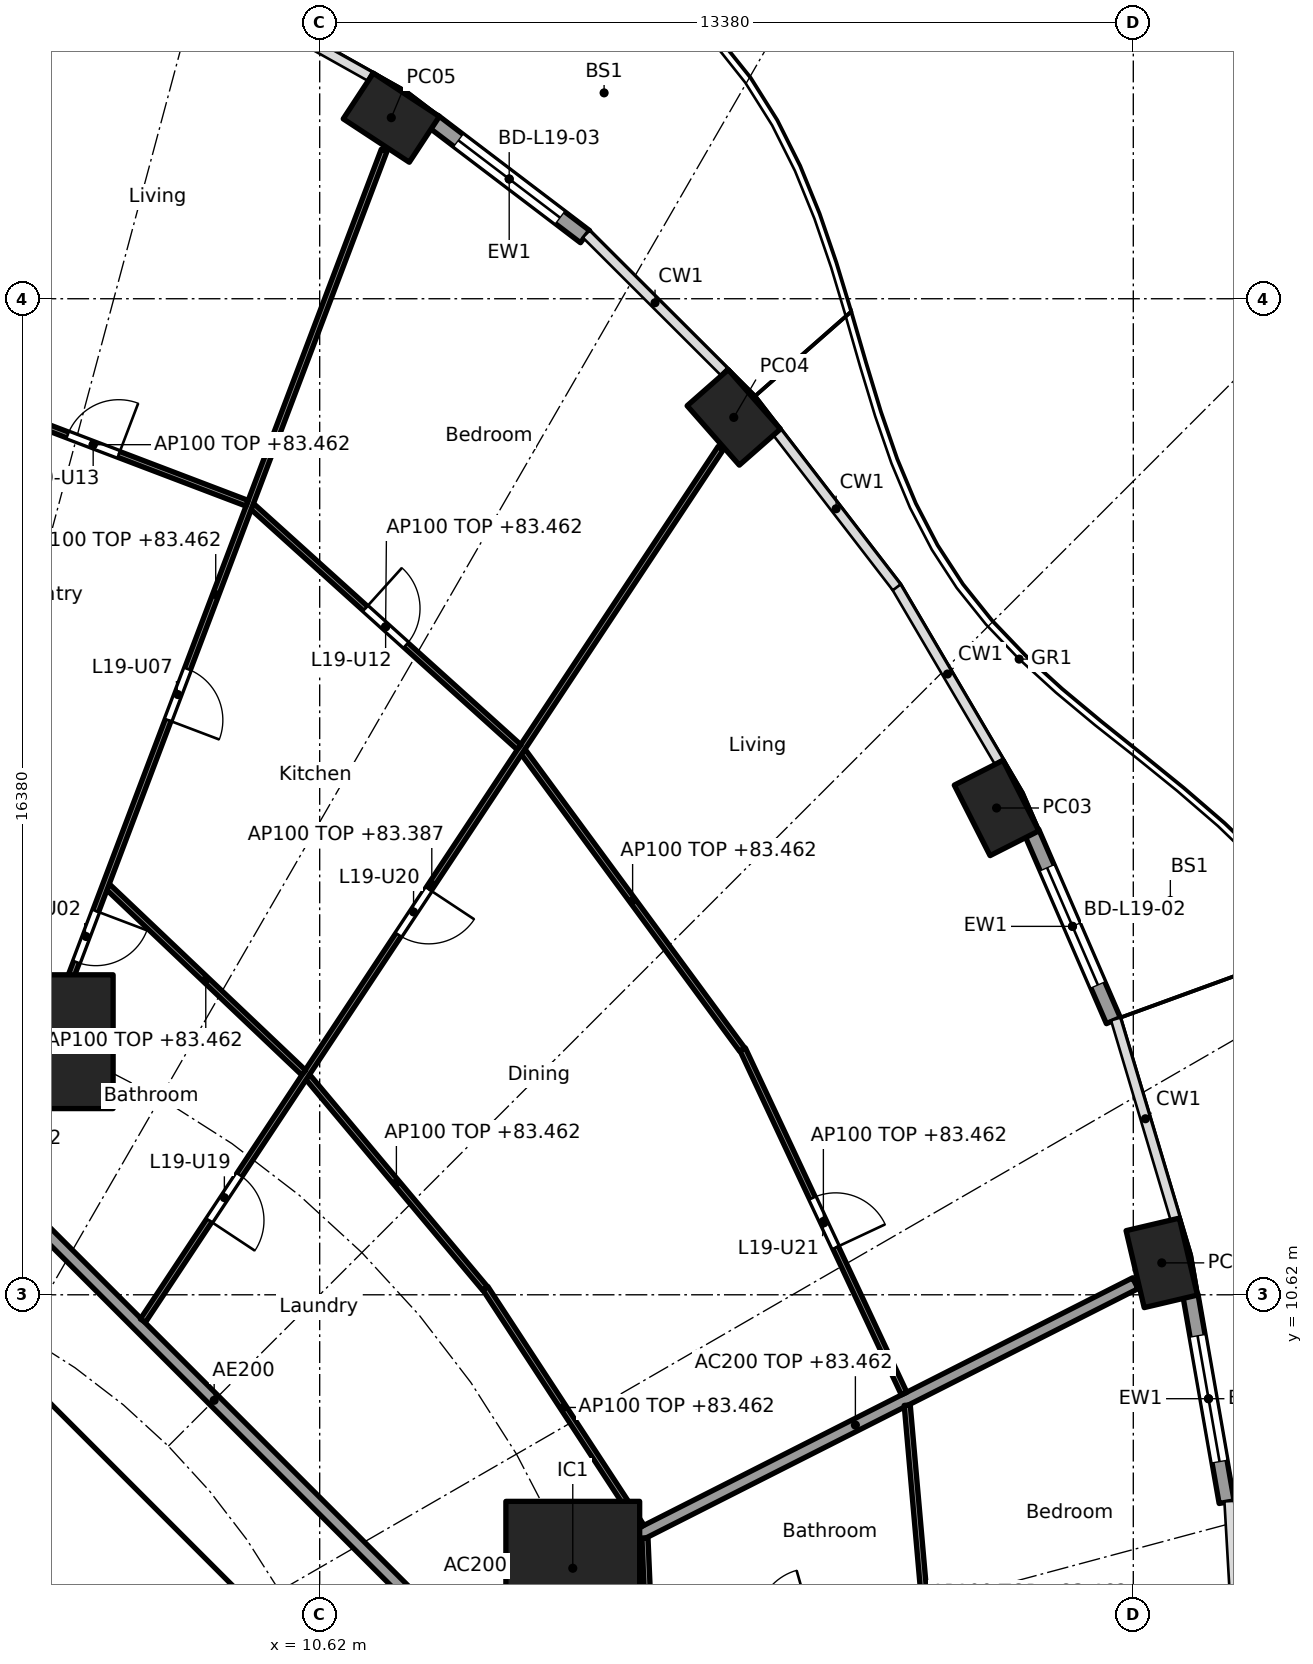
"""IFC4 building model, lengths in metres.
Left out: names, types, materials, properties, quantities, classifications, styles, units other than length and angle.
Written with IfcOpenShell. Run it as: python <this file> out.ifc"""

import sys

from ifc_helpers import new_model, si_unit, direction, frame, frame_2d, origin, origin_2d, place, context, subcontext, project, spatial, rectangle, hollow_rectangle, extrude, element, fill, save


model = new_model("IFC4")
c1 = context("Model", 3, precision=1e-05, world=origin(), true_north=direction((0.0, 1.0)))
c2 = subcontext(c1, "Body", "Model", "MODEL_VIEW")
j1 = project(units=[si_unit("LENGTHUNIT", "METRE"), si_unit("PLANEANGLEUNIT", "RADIAN")], contexts=[c1])
p1 = place(None, origin())
s1 = spatial("IfcSite", under=j1, at=p1, CompositionType="ELEMENT")
p2 = place(p1, origin())
s2 = spatial("IfcBuilding", under=s1, at=p2, CompositionType="ELEMENT")
p3 = place(p2, frame((0.0, 0.0, 80.7)))
s3 = spatial("IfcBuildingStorey", under=s2, at=p3, CompositionType="ELEMENT", Elevation=80.7)
for number, where, z_axis, x_axis in (
    (1, (24.468, 11.145, 0.0), (0.0, 0.0, 1.0), (-0.229, 0.973, 0.0)),
    (2, (21.751, 18.625, 0.0), (0.0, 0.0, 1.0), (-0.452, 0.892, 0.0)),
    (3, (17.43, 25.049, 0.0), (0.0, 0.0, 1.0), (-0.66, 0.751, 0.0)),
    (4, (11.798, 29.978, 0.0), (0.0, 0.0, 1.0), (-0.836, 0.549, 0.0)),
):
    element("IfcColumn", number, at=place(p3, frame(where, z_axis=z_axis, x_axis=x_axis)), inside=s3, PredefinedType="COLUMN", context=c2, shape_type="SweptSolid", body=[
        extrude(hollow_rectangle(XDim=1.3, YDim=0.9, WallThickness=0.045, at=origin_2d()), origin(), (0.0, 0.0, 1.0), 3.7),
    ])
for number, where, z_axis, x_axis in (
    (5, (14.782, 6.123, 0.0), (0.0, 0.0, 1.0), (1.0, 0.0, 0.0)),
    (6, (6.123, 14.782, 0.0), (0.0, 0.0, 1.0), (1.0, 0.0, 0.0)),
):
    element("IfcColumn", number, at=place(p3, frame(where, z_axis=z_axis, x_axis=x_axis)), inside=s3, PredefinedType="COLUMN", context=c2, shape_type="SweptSolid", body=[
        extrude(rectangle(XDim=2.2, YDim=2.2, at=origin_2d()), origin(), (0.0, 0.0, 1.0), 3.7),
    ])
p4 = place(p3, frame((24.94, 10.613, 0.0), z_axis=(0.0, 0.0, 1.0), x_axis=(0.172164316671, -0.985068245385, 0.0)))
e7 = element("IfcWall", 7, at=p4, inside=s3, PredefinedType="SOLIDWALL", context=c2, shape_type="SweptSolid", body=[
    extrude(rectangle(XDim=3.454, YDim=0.25, at=frame_2d((1.727, 0.0))), origin(), (0.0, 0.0, 1.0), 3.44),
])
p5 = place(p4, frame((0.677, 0.0, 0.0)))
e8 = element("IfcOpeningElement", 8, at=p5, cuts=e7, PredefinedType="OPENING", context=c2, shape_type="SweptSolid", body=[
    extrude(rectangle(XDim=2.1, YDim=2.4, at=frame_2d((1.05, 1.2))), frame((0.0, 0.135, 0.0), z_axis=(0.0, -1.0, 0.0), x_axis=(1.0, 0.0, 0.0)), (0.0, 0.0, 1.0), 0.27),
])
p6 = place(p3, frame((22.328, 18.229, 0.0), z_axis=(0.0, 0.0, 1.0), x_axis=(0.397621629246, -0.917549475481, 0.0)))
e9 = element("IfcWall", 9, at=p6, inside=s3, PredefinedType="SOLIDWALL", context=c2, shape_type="SweptSolid", body=[
    extrude(rectangle(XDim=3.379, YDim=0.25, at=frame_2d((1.69, 0.0))), origin(), (0.0, 0.0, 1.0), 3.44),
])
p7 = place(p6, frame((0.64, 0.0, 0.0)))
e10 = element("IfcOpeningElement", 10, at=p7, cuts=e9, PredefinedType="OPENING", context=c2, shape_type="SweptSolid", body=[
    extrude(rectangle(XDim=2.1, YDim=2.4, at=frame_2d((1.05, 1.2))), frame((0.0, 0.135, 0.0), z_axis=(0.0, -1.0, 0.0), x_axis=(1.0, 0.0, 0.0)), (0.0, 0.0, 1.0), 0.27),
])
p8 = place(p3, frame((12.489, 29.917, 0.0), z_axis=(0.0, 0.0, 1.0), x_axis=(0.796037575978, -0.605247203736, 0.0)))
e11 = element("IfcWall", 11, at=p8, inside=s3, PredefinedType="SOLIDWALL", context=c2, shape_type="SweptSolid", body=[
    extrude(rectangle(XDim=3.134, YDim=0.25, at=frame_2d((1.567, 0.0))), origin(), (0.0, 0.0, 1.0), 3.44),
])
p9 = place(p8, frame((0.517, 0.0, 0.0)))
e12 = element("IfcOpeningElement", 12, at=p9, cuts=e11, PredefinedType="OPENING", context=c2, shape_type="SweptSolid", body=[
    extrude(rectangle(XDim=2.1, YDim=2.4, at=frame_2d((1.05, 1.2))), frame((0.0, 0.135, 0.0), z_axis=(0.0, -1.0, 0.0), x_axis=(1.0, 0.0, 0.0)), (0.0, 0.0, 1.0), 0.27),
])
p10 = place(p3, frame((9.988, 4.613, 0.0), z_axis=(0.0, 0.0, 1.0), x_axis=(-0.707106781187, 0.707106781187, 0.0)))
e13 = element("IfcWall", 13, at=p10, inside=s3, PredefinedType="SHEAR", context=c2, shape_type="SweptSolid", body=[
    extrude(rectangle(XDim=7.602, YDim=0.6, at=frame_2d((3.801, 0.0))), origin(), (0.0, 0.0, 1.0), 3.44),
])
p11 = place(p10, frame((3.201, 0.0, 0.0)))
e14 = element("IfcOpeningElement", 14, at=p11, cuts=e13, PredefinedType="OPENING", context=c2, shape_type="SweptSolid", body=[
    extrude(rectangle(XDim=1.2, YDim=2.1, at=frame_2d((0.6, 1.05))), frame((0.0, 0.31, 0.0), z_axis=(0.0, -1.0, 0.0), x_axis=(1.0, 0.0, 0.0)), (0.0, 0.0, 1.0), 0.62),
])
p12 = place(p3, frame((12.657, 5.243, 0.0), z_axis=(0.0, 0.0, 1.0), x_axis=(0.923876145736, 0.382691608661, 0.0)))
e15 = element("IfcWall", 15, at=p12, inside=s3, PredefinedType="PARTITIONING", context=c2, shape_type="SweptSolid", body=[
    extrude(rectangle(XDim=2.2, YDim=0.2, at=frame_2d((1.1, 0.0))), origin(), (0.0, 0.0, 1.0), 3.44),
])
p13 = place(p3, frame((14.827, 6.146, 0.0), z_axis=(0.0, 0.0, 1.0), x_axis=(0.892068075337, 0.451901038906, 0.0)))
e16 = element("IfcWall", 16, at=p13, inside=s3, PredefinedType="PARTITIONING", context=c2, shape_type="SweptSolid", body=[
    extrude(rectangle(XDim=10.32, YDim=0.2, at=frame_2d((5.16, 0.0))), origin(), (0.0, 0.0, 1.0), 2.762),
])
p14 = place(p3, frame((12.635, 5.134, 0.0), z_axis=(0.0, 0.0, 1.0), x_axis=(-0.707106781187, 0.707106781187, 0.0)))
e17 = element("IfcWall", 17, at=p14, inside=s3, PredefinedType="PARTITIONING", context=c2, shape_type="SweptSolid", body=[
    extrude(rectangle(XDim=10.609, YDim=0.2, at=frame_2d((5.305, 0.0))), origin(), (0.0, 0.0, 1.0), 3.44),
])
p15 = place(p3, frame((20.825, 2.642, 0.0), z_axis=(0.0, 0.0, 1.0), x_axis=(-0.087760219522, 0.996141628419, 0.0)))
e18 = element("IfcWall", 18, at=p15, inside=s3, PredefinedType="PARTITIONING", context=c2, shape_type="SweptSolid", body=[
    extrude(rectangle(XDim=6.187, YDim=0.1, at=frame_2d((3.094, 0.0))), origin(), (0.0, 0.0, 1.0), 2.762),
])
p16 = place(p3, frame((16.064, 4.415, 0.0), z_axis=(0.0, 0.0, 1.0), x_axis=(-0.043101501373, 0.999070698489, 0.0)))
e19 = element("IfcWall", 19, at=p16, inside=s3, PredefinedType="PARTITIONING", context=c2, shape_type="SweptSolid", body=[
    extrude(rectangle(XDim=2.209, YDim=0.1, at=frame_2d((1.104, 0.0))), origin(), (0.0, 0.0, 1.0), 3.44),
])
p17 = place(p3, frame((15.91, 6.806, 0.0), z_axis=(0.0, 0.0, 1.0), x_axis=(-0.547468243486, 0.836826458936, 0.0)))
e20 = element("IfcWall", 20, at=p17, inside=s3, PredefinedType="PARTITIONING", context=c2, shape_type="SweptSolid", body=[
    extrude(rectangle(XDim=4.688, YDim=0.1, at=frame_2d((2.344, 0.0))), origin(), (0.0, 0.0, 1.0), 2.762),
])
p18 = place(p3, frame((20.231, 8.995, 0.0), z_axis=(0.0, 0.0, 1.0), x_axis=(-0.424587886407, 0.905386727712, 0.0)))
e21 = element("IfcWall", 21, at=p18, inside=s3, PredefinedType="PARTITIONING", context=c2, shape_type="SweptSolid", body=[
    extrude(rectangle(XDim=6.254, YDim=0.1, at=frame_2d((3.127, 0.0))), origin(), (0.0, 0.0, 1.0), 2.762),
])
p19 = place(p18, frame((2.652, 0.0, 0.0)))
e22 = element("IfcOpeningElement", 22, at=p19, cuts=e21, PredefinedType="OPENING", context=c2, shape_type="SweptSolid", body=[
    extrude(rectangle(XDim=0.9, YDim=2.1, at=frame_2d((0.45, 1.05))), frame((0.0, 0.06, 0.0), z_axis=(0.0, -1.0, 0.0), x_axis=(1.0, 0.0, 0.0)), (0.0, 0.0, 1.0), 0.12),
])
p20 = place(p3, frame((13.339, 10.725, 0.0), z_axis=(0.0, 0.0, 1.0), x_axis=(-0.642515455924, 0.766272724882, 0.0)))
e23 = element("IfcWall", 23, at=p20, inside=s3, PredefinedType="PARTITIONING", context=c2, shape_type="SweptSolid", body=[
    extrude(rectangle(XDim=4.537, YDim=0.1, at=frame_2d((2.269, 0.0))), origin(), (0.0, 0.0, 1.0), 2.762),
])
p21 = place(p3, frame((17.567, 14.653, 0.0), z_axis=(0.0, 0.0, 1.0), x_axis=(-0.592391983588, 0.80564988536, 0.0)))
e24 = element("IfcWall", 24, at=p21, inside=s3, PredefinedType="PARTITIONING", context=c2, shape_type="SweptSolid", body=[
    extrude(rectangle(XDim=6.08, YDim=0.1, at=frame_2d((3.04, 0.0))), origin(), (0.0, 0.0, 1.0), 2.762),
])
p22 = place(p3, frame((7.713, 10.195, 0.0), z_axis=(0.0, 0.0, 1.0), x_axis=(0.552111071171, 0.833770571015, 0.0)))
e25 = element("IfcWall", 25, at=p22, inside=s3, PredefinedType="PARTITIONING", context=c2, shape_type="SweptSolid", body=[
    extrude(rectangle(XDim=17.208, YDim=0.1, at=frame_2d((8.604, 0.0))), origin(), (0.0, 0.0, 1.0), 2.687),
])
p23 = place(p22, frame((1.976, 0.0, 0.0)))
e26 = element("IfcOpeningElement", 26, at=p23, cuts=e25, PredefinedType="OPENING", context=c2, shape_type="SweptSolid", body=[
    extrude(rectangle(XDim=0.9, YDim=2.1, at=frame_2d((0.45, 1.05))), frame((0.0, 0.06, 0.0), z_axis=(0.0, -1.0, 0.0), x_axis=(1.0, 0.0, 0.0)), (0.0, 0.0, 1.0), 0.12),
])
p24 = place(p22, frame((7.611, 0.0, 0.0)))
e27 = element("IfcOpeningElement", 27, at=p24, cuts=e25, PredefinedType="OPENING", context=c2, shape_type="SweptSolid", body=[
    extrude(rectangle(XDim=0.9, YDim=2.1, at=frame_2d((0.45, 1.05))), frame((0.0, 0.06, 0.0), z_axis=(0.0, -1.0, 0.0), x_axis=(1.0, 0.0, 0.0)), (0.0, 0.0, 1.0), 0.12),
])
p25 = place(p3, frame((10.355, 14.274, 0.0), z_axis=(0.0, 0.0, 1.0), x_axis=(-0.725219204328, 0.688518050361, 0.0)))
e28 = element("IfcWall", 28, at=p25, inside=s3, PredefinedType="PARTITIONING", context=c2, shape_type="SweptSolid", body=[
    extrude(rectangle(XDim=4.437, YDim=0.1, at=frame_2d((2.219, 0.0))), origin(), (0.0, 0.0, 1.0), 2.762),
])
p26 = place(p3, frame((13.898, 19.625, 0.0), z_axis=(0.0, 0.0, 1.0), x_axis=(-0.742400132046, 0.669956747812, 0.0)))
e29 = element("IfcWall", 29, at=p26, inside=s3, PredefinedType="PARTITIONING", context=c2, shape_type="SweptSolid", body=[
    extrude(rectangle(XDim=5.911, YDim=0.1, at=frame_2d((2.956, 0.0))), origin(), (0.0, 0.0, 1.0), 2.762),
])
p27 = place(p26, frame((2.506, 0.0, 0.0)))
e30 = element("IfcOpeningElement", 30, at=p27, cuts=e29, PredefinedType="OPENING", context=c2, shape_type="SweptSolid", body=[
    extrude(rectangle(XDim=0.9, YDim=2.1, at=frame_2d((0.45, 1.05))), frame((0.0, 0.06, 0.0), z_axis=(0.0, -1.0, 0.0), x_axis=(1.0, 0.0, 0.0)), (0.0, 0.0, 1.0), 0.12),
])
p28 = place(p3, frame((6.141, 14.829, 0.0), z_axis=(0.0, 0.0, 1.0), x_axis=(0.354477134193, 0.935064682968, 0.0)))
e31 = element("IfcWall", 31, at=p28, inside=s3, PredefinedType="PARTITIONING", context=c2, shape_type="SweptSolid", body=[
    extrude(rectangle(XDim=15.626, YDim=0.1, at=frame_2d((7.813, 0.0))), origin(), (0.0, 0.0, 1.0), 2.762),
])
p29 = place(p28, frame((1.35, 0.0, 0.0)))
e32 = element("IfcOpeningElement", 32, at=p29, cuts=e31, PredefinedType="OPENING", context=c2, shape_type="SweptSolid", body=[
    extrude(rectangle(XDim=0.9, YDim=2.1, at=frame_2d((0.45, 1.05))), frame((0.0, 0.06, 0.0), z_axis=(0.0, -1.0, 0.0), x_axis=(1.0, 0.0, 0.0)), (0.0, 0.0, 1.0), 0.12),
])
p30 = place(p28, frame((5.606, 0.0, 0.0)))
e33 = element("IfcOpeningElement", 33, at=p30, cuts=e31, PredefinedType="OPENING", context=c2, shape_type="SweptSolid", body=[
    extrude(rectangle(XDim=0.9, YDim=2.1, at=frame_2d((0.45, 1.05))), frame((0.0, 0.06, 0.0), z_axis=(0.0, -1.0, 0.0), x_axis=(1.0, 0.0, 0.0)), (0.0, 0.0, 1.0), 0.12),
])
p31 = place(p3, frame((9.426, 23.637, 0.0), z_axis=(0.0, 0.0, 1.0), x_axis=(-0.93461405629, 0.355663557011, 0.0)))
e34 = element("IfcWall", 34, at=p31, inside=s3, PredefinedType="PARTITIONING", context=c2, shape_type="SweptSolid", body=[
    extrude(rectangle(XDim=5.417, YDim=0.1, at=frame_2d((2.708, 0.0))), origin(), (0.0, 0.0, 1.0), 2.762),
])
p32 = place(p31, frame((2.258, 0.0, 0.0)))
e35 = element("IfcOpeningElement", 35, at=p32, cuts=e34, PredefinedType="OPENING", context=c2, shape_type="SweptSolid", body=[
    extrude(rectangle(XDim=0.9, YDim=2.1, at=frame_2d((0.45, 1.05))), frame((0.0, 0.06, 0.0), z_axis=(0.0, -1.0, 0.0), x_axis=(1.0, 0.0, 0.0)), (0.0, 0.0, 1.0), 0.12),
])
p33 = place(p5, origin())
e36 = element("IfcDoor", 36, at=p33, inside=s3, OperationType="SLIDING_TO_LEFT", PredefinedType="DOOR", context=c2, shape_type="SweptSolid", body=[
    extrude(rectangle(XDim=2.1, YDim=2.4, at=frame_2d((1.05, 1.2))), frame((0.0, 0.025, 0.0), z_axis=(0.0, -1.0, 0.0), x_axis=(1.0, 0.0, 0.0)), (0.0, 0.0, 1.0), 0.05),
])
fill(e8, e36)
p34 = place(p7, origin())
e37 = element("IfcDoor", 37, at=p34, inside=s3, OperationType="SLIDING_TO_LEFT", PredefinedType="DOOR", context=c2, shape_type="SweptSolid", body=[
    extrude(rectangle(XDim=2.1, YDim=2.4, at=frame_2d((1.05, 1.2))), frame((0.0, 0.025, 0.0), z_axis=(0.0, -1.0, 0.0), x_axis=(1.0, 0.0, 0.0)), (0.0, 0.0, 1.0), 0.05),
])
fill(e10, e37)
p35 = place(p9, origin())
e38 = element("IfcDoor", 38, at=p35, inside=s3, OperationType="SLIDING_TO_LEFT", PredefinedType="DOOR", context=c2, shape_type="SweptSolid", body=[
    extrude(rectangle(XDim=2.1, YDim=2.4, at=frame_2d((1.05, 1.2))), frame((0.0, 0.025, 0.0), z_axis=(0.0, -1.0, 0.0), x_axis=(1.0, 0.0, 0.0)), (0.0, 0.0, 1.0), 0.05),
])
fill(e12, e38)
p36 = place(p11, origin())
e39 = element("IfcDoor", 39, at=p36, inside=s3, OperationType="SINGLE_SWING_LEFT", PredefinedType="DOOR", context=c2, shape_type="SweptSolid", body=[
    extrude(rectangle(XDim=1.2, YDim=2.1, at=frame_2d((0.6, 1.05))), frame((0.0, 0.025, 0.0), z_axis=(0.0, -1.0, 0.0), x_axis=(1.0, 0.0, 0.0)), (0.0, 0.0, 1.0), 0.05),
])
fill(e14, e39)
p37 = place(p29, frame((0.9, 0.0, 0.0), x_axis=(-1.0, 0.0, 0.0)))
e40 = element("IfcDoor", 40, at=p37, inside=s3, OperationType="SINGLE_SWING_LEFT", PredefinedType="DOOR", context=c2, shape_type="SweptSolid", body=[
    extrude(rectangle(XDim=0.9, YDim=2.1, at=frame_2d((0.45, 1.05))), frame((0.0, 0.025, 0.0), z_axis=(0.0, -1.0, 0.0), x_axis=(1.0, 0.0, 0.0)), (0.0, 0.0, 1.0), 0.05),
])
fill(e32, e40)
p38 = place(p30, frame((0.9, 0.0, 0.0), x_axis=(-1.0, 0.0, 0.0)))
e41 = element("IfcDoor", 41, at=p38, inside=s3, OperationType="SINGLE_SWING_RIGHT", PredefinedType="DOOR", context=c2, shape_type="SweptSolid", body=[
    extrude(rectangle(XDim=0.9, YDim=2.1, at=frame_2d((0.45, 1.05))), frame((0.0, 0.025, 0.0), z_axis=(0.0, -1.0, 0.0), x_axis=(1.0, 0.0, 0.0)), (0.0, 0.0, 1.0), 0.05),
])
fill(e33, e41)
p39 = place(p27, frame((0.9, 0.0, 0.0), x_axis=(-1.0, 0.0, 0.0)))
e42 = element("IfcDoor", 42, at=p39, inside=s3, OperationType="SINGLE_SWING_LEFT", PredefinedType="DOOR", context=c2, shape_type="SweptSolid", body=[
    extrude(rectangle(XDim=0.9, YDim=2.1, at=frame_2d((0.45, 1.05))), frame((0.0, 0.025, 0.0), z_axis=(0.0, -1.0, 0.0), x_axis=(1.0, 0.0, 0.0)), (0.0, 0.0, 1.0), 0.05),
])
fill(e30, e42)
p40 = place(p32, frame((0.9, 0.0, 0.0), x_axis=(-1.0, 0.0, 0.0)))
e43 = element("IfcDoor", 43, at=p40, inside=s3, OperationType="SINGLE_SWING_RIGHT", PredefinedType="DOOR", context=c2, shape_type="SweptSolid", body=[
    extrude(rectangle(XDim=0.9, YDim=2.1, at=frame_2d((0.45, 1.05))), frame((0.0, 0.025, 0.0), z_axis=(0.0, -1.0, 0.0), x_axis=(1.0, 0.0, 0.0)), (0.0, 0.0, 1.0), 0.05),
])
fill(e35, e43)
p41 = place(p23, frame((0.9, 0.0, 0.0), x_axis=(-1.0, 0.0, 0.0)))
e44 = element("IfcDoor", 44, at=p41, inside=s3, OperationType="SINGLE_SWING_RIGHT", PredefinedType="DOOR", context=c2, shape_type="SweptSolid", body=[
    extrude(rectangle(XDim=0.9, YDim=2.1, at=frame_2d((0.45, 1.05))), frame((0.0, 0.025, 0.0), z_axis=(0.0, -1.0, 0.0), x_axis=(1.0, 0.0, 0.0)), (0.0, 0.0, 1.0), 0.05),
])
fill(e26, e44)
p42 = place(p24, frame((0.9, 0.0, 0.0), x_axis=(-1.0, 0.0, 0.0)))
e45 = element("IfcDoor", 45, at=p42, inside=s3, OperationType="SINGLE_SWING_LEFT", PredefinedType="DOOR", context=c2, shape_type="SweptSolid", body=[
    extrude(rectangle(XDim=0.9, YDim=2.1, at=frame_2d((0.45, 1.05))), frame((0.0, 0.025, 0.0), z_axis=(0.0, -1.0, 0.0), x_axis=(1.0, 0.0, 0.0)), (0.0, 0.0, 1.0), 0.05),
])
fill(e27, e45)
p43 = place(p19, frame((0.9, 0.0, 0.0), x_axis=(-1.0, 0.0, 0.0)))
e46 = element("IfcDoor", 46, at=p43, inside=s3, OperationType="SINGLE_SWING_RIGHT", PredefinedType="DOOR", context=c2, shape_type="SweptSolid", body=[
    extrude(rectangle(XDim=0.9, YDim=2.1, at=frame_2d((0.45, 1.05))), frame((0.0, 0.025, 0.0), z_axis=(0.0, -1.0, 0.0), x_axis=(1.0, 0.0, 0.0)), (0.0, 0.0, 1.0), 0.05),
])
fill(e22, e46)
save(model, sys.argv[1])
